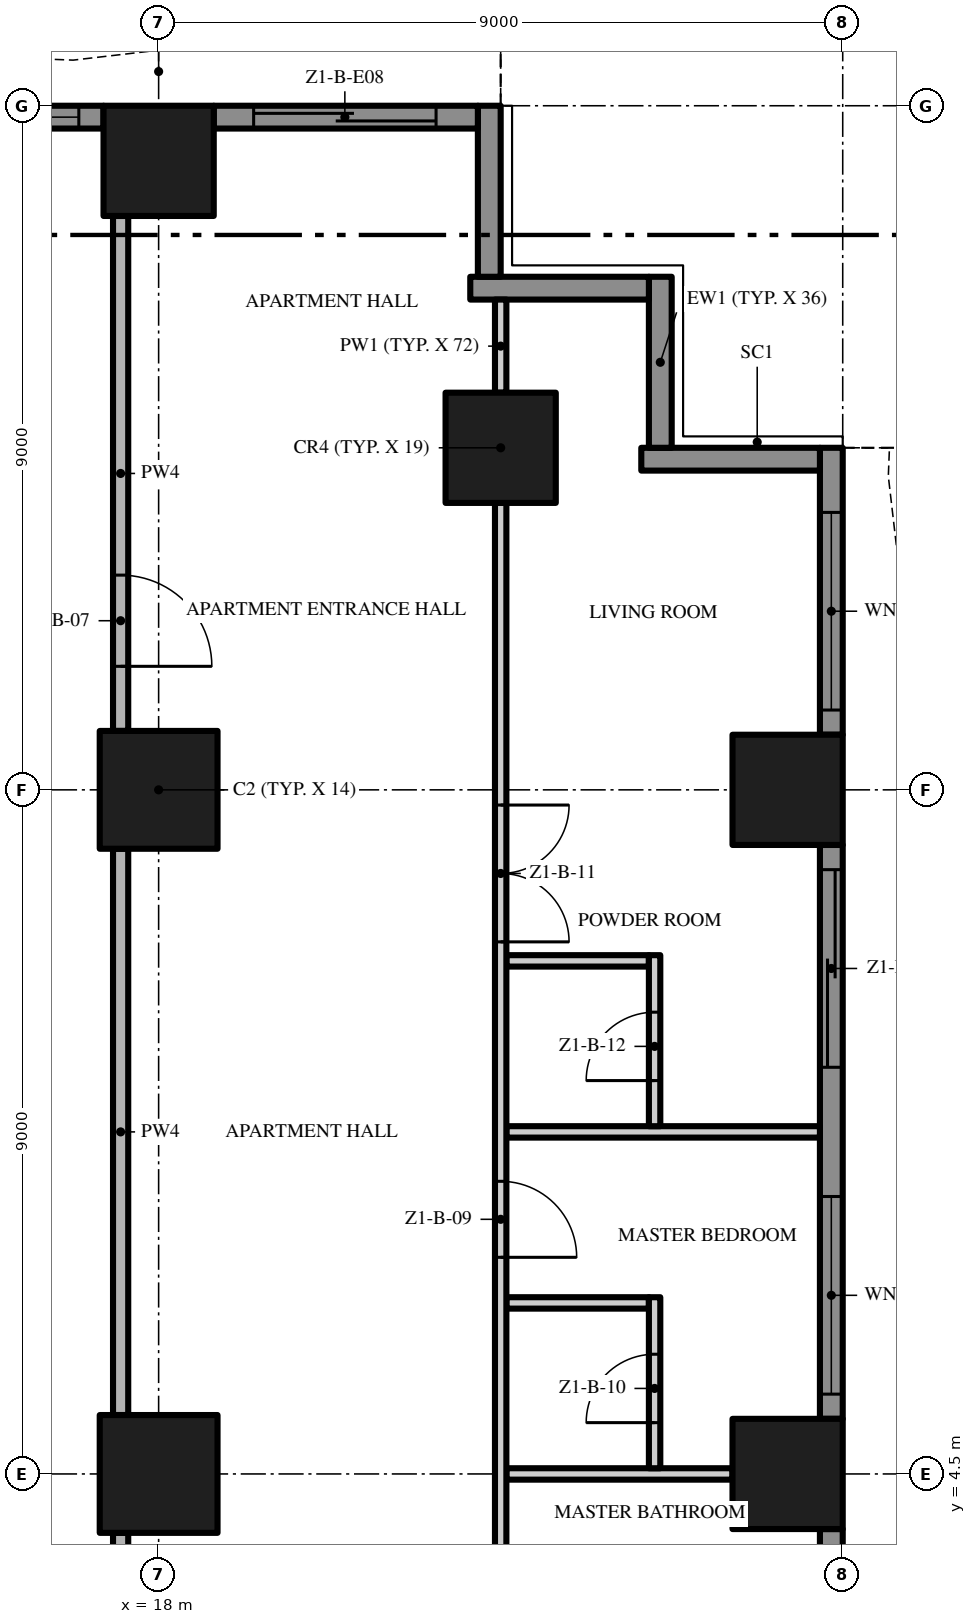
"""IFC4 building model, lengths in metres.
Left out: names, types, materials, properties, quantities, classifications, styles, units other than length and angle.
Written with IfcOpenShell. Run it as: python <this file> out.ifc"""

import sys

from ifc_helpers import new_model, si_unit, direction, frame, frame_2d, origin, origin_2d, place, context, subcontext, project, spatial, polyline, rectangle, outline, extrude, element, fill, save


model = new_model("IFC4")
c1 = context("Model", 3, precision=1e-05, world=origin(), true_north=direction((0.0, 1.0)))
c2 = subcontext(c1, "Body", "Model", "MODEL_VIEW")
j1 = project(units=[si_unit("LENGTHUNIT", "METRE"), si_unit("PLANEANGLEUNIT", "RADIAN")], contexts=[c1])
p1 = place(None, origin())
s1 = spatial("IfcSite", under=j1, at=p1, CompositionType="ELEMENT")
p2 = place(p1, origin())
s2 = spatial("IfcBuilding", under=s1, at=p2, CompositionType="ELEMENT")
p3 = place(p2, frame((0.0, 0.0, 26.4)))
s3 = spatial("IfcBuildingStorey", under=s2, at=p3, CompositionType="ELEMENT", Elevation=26.4)
p4 = place(p3, frame((18.0, 13.5, 0.0), z_axis=(0.0, 0.0, 1.0), x_axis=(1.0, 0.0, 0.0)))
e1 = element("IfcColumn", 1, at=p4, inside=s3, PredefinedType="COLUMN", context=c2, shape_type="SweptSolid", body=[
    extrude(rectangle(XDim=1.55, YDim=1.55, at=origin_2d()), origin(), (0.0, 0.0, 1.0), 3.5),
])
p5 = place(p3, frame((18.0, 21.775, 0.0), z_axis=(0.0, 0.0, 1.0), x_axis=(1.0, 0.0, 0.0)))
e2 = element("IfcColumn", 2, at=p5, inside=s3, PredefinedType="COLUMN", context=c2, shape_type="SweptSolid", body=[
    extrude(rectangle(XDim=1.45, YDim=1.45, at=origin_2d()), origin(), (0.0, 0.0, 1.0), 3.5),
])
p6 = place(p3, frame((18.0, 4.5, 0.0), z_axis=(0.0, 0.0, 1.0), x_axis=(1.0, 0.0, 0.0)))
e3 = element("IfcColumn", 3, at=p6, inside=s3, PredefinedType="COLUMN", context=c2, shape_type="SweptSolid", body=[
    extrude(rectangle(XDim=1.55, YDim=1.55, at=origin_2d()), origin(), (0.0, 0.0, 1.0), 3.5),
])
for number, where, z_axis, x_axis in (
    (4, (26.275, 13.5, 0.0), (0.0, 0.0, 1.0), (1.0, 0.0, 0.0)),
    (5, (22.5, 18.0, 0.0), (0.0, 0.0, 1.0), (1.0, 0.0, 0.0)),
    (6, (26.275, 4.5, 0.0), (0.0, 0.0, 1.0), (1.0, 0.0, 0.0)),
):
    element("IfcColumn", number, at=place(p3, frame(where, z_axis=z_axis, x_axis=x_axis)), inside=s3, PredefinedType="COLUMN", context=c2, shape_type="SweptSolid", body=[
        extrude(rectangle(XDim=1.45, YDim=1.45, at=origin_2d()), origin(), (0.0, 0.0, 1.0), 3.5),
    ])
p7 = place(p3, frame((26.85, 3.775, 0.0), z_axis=(0.0, 0.0, 1.0), x_axis=(0.0, -1.0, 0.0)))
e7 = element("IfcWall", 7, at=p7, inside=s3, PredefinedType="SOLIDWALL", context=c2, shape_type="SweptSolid", body=[
    extrude(rectangle(XDim=7.55, YDim=0.3, at=frame_2d((3.775, 0.0))), origin(), (0.0, 0.0, 1.0), 3.5),
])
p8 = place(p7, frame((4.625, 0.0, 0.0)))
e8 = element("IfcOpeningElement", 8, at=p8, cuts=e7, PredefinedType="OPENING", context=c2, shape_type="SweptSolid", body=[
    extrude(rectangle(XDim=2.6, YDim=2.4, at=frame_2d((1.3, 1.2))), frame((0.0, 0.16, 0.0), z_axis=(0.0, -1.0, 0.0), x_axis=(1.0, 0.0, 0.0)), (0.0, 0.0, 1.0), 0.32),
])
p9 = place(p7, frame((0.325, 0.0, 0.45)))
e9 = element("IfcOpeningElement", 9, at=p9, cuts=e7, PredefinedType="OPENING", context=c2, shape_type="SweptSolid", body=[
    extrude(rectangle(XDim=2.6, YDim=2.65, at=frame_2d((1.3, 1.325))), frame((0.0, 0.16, 0.0), z_axis=(0.0, -1.0, 0.0), x_axis=(1.0, 0.0, 0.0)), (0.0, 0.0, 1.0), 0.32),
])
p10 = place(p3, frame((26.85, 12.775, 0.0), z_axis=(0.0, 0.0, 1.0), x_axis=(0.0, -1.0, 0.0)))
e10 = element("IfcWall", 10, at=p10, inside=s3, PredefinedType="SOLIDWALL", context=c2, shape_type="SweptSolid", body=[
    extrude(rectangle(XDim=7.55, YDim=0.3, at=frame_2d((3.775, 0.0))), origin(), (0.0, 0.0, 1.0), 3.5),
])
p11 = place(p10, frame((4.625, 0.0, 0.45)))
e11 = element("IfcOpeningElement", 11, at=p11, cuts=e10, PredefinedType="OPENING", context=c2, shape_type="SweptSolid", body=[
    extrude(rectangle(XDim=2.6, YDim=2.65, at=frame_2d((1.3, 1.325))), frame((0.0, 0.16, 0.0), z_axis=(0.0, -1.0, 0.0), x_axis=(1.0, 0.0, 0.0)), (0.0, 0.0, 1.0), 0.32),
])
p12 = place(p10, frame((0.325, 0.0, 0.0)))
e12 = element("IfcOpeningElement", 12, at=p12, cuts=e10, PredefinedType="OPENING", context=c2, shape_type="SweptSolid", body=[
    extrude(rectangle(XDim=2.6, YDim=2.4, at=frame_2d((1.3, 1.2))), frame((0.0, 0.16, 0.0), z_axis=(0.0, -1.0, 0.0), x_axis=(1.0, 0.0, 0.0)), (0.0, 0.0, 1.0), 0.32),
])
p13 = place(p3, frame((26.85, 18.0, 0.0), z_axis=(0.0, 0.0, 1.0), x_axis=(0.0, -1.0, 0.0)))
e13 = element("IfcWall", 13, at=p13, inside=s3, PredefinedType="SOLIDWALL", context=c2, shape_type="SweptSolid", body=[
    extrude(rectangle(XDim=3.775, YDim=0.3, at=frame_2d((1.887, 0.0))), origin(), (0.0, 0.0, 1.0), 3.5),
])
p14 = place(p13, frame((0.85, 0.0, 0.45)))
e14 = element("IfcOpeningElement", 14, at=p14, cuts=e13, PredefinedType="OPENING", context=c2, shape_type="SweptSolid", body=[
    extrude(rectangle(XDim=2.6, YDim=2.65, at=frame_2d((1.3, 1.325))), frame((0.0, 0.16, 0.0), z_axis=(0.0, -1.0, 0.0), x_axis=(1.0, 0.0, 0.0)), (0.0, 0.0, 1.0), 0.32),
])
p15 = place(p3, frame((24.35, 17.85, 0.0), z_axis=(0.0, 0.0, 1.0), x_axis=(1.0, 0.0, 0.0)))
e15 = element("IfcWall", 15, at=p15, inside=s3, PredefinedType="SOLIDWALL", context=c2, shape_type="SweptSolid", body=[
    extrude(rectangle(XDim=2.35, YDim=0.3, at=frame_2d((1.175, 0.0))), origin(), (0.0, 0.0, 1.0), 3.5),
])
p16 = place(p3, frame((24.6, 20.25, 0.0), z_axis=(0.0, 0.0, 1.0), x_axis=(0.0, -1.0, 0.0)))
e16 = element("IfcWall", 16, at=p16, inside=s3, PredefinedType="SOLIDWALL", context=c2, shape_type="SweptSolid", body=[
    extrude(rectangle(XDim=2.25, YDim=0.3, at=frame_2d((1.125, 0.0))), origin(), (0.0, 0.0, 1.0), 3.5),
])
p17 = place(p3, frame((22.1, 20.1, 0.0), z_axis=(0.0, 0.0, 1.0), x_axis=(1.0, 0.0, 0.0)))
e17 = element("IfcWall", 17, at=p17, inside=s3, PredefinedType="SOLIDWALL", context=c2, shape_type="SweptSolid", body=[
    extrude(rectangle(XDim=2.35, YDim=0.3, at=frame_2d((1.175, 0.0))), origin(), (0.0, 0.0, 1.0), 3.5),
])
p18 = place(p3, frame((22.35, 22.5, 0.0), z_axis=(0.0, 0.0, 1.0), x_axis=(0.0, -1.0, 0.0)))
e18 = element("IfcWall", 18, at=p18, inside=s3, PredefinedType="SOLIDWALL", context=c2, shape_type="SweptSolid", body=[
    extrude(rectangle(XDim=2.25, YDim=0.3, at=frame_2d((1.125, 0.0))), origin(), (0.0, 0.0, 1.0), 3.5),
])
p19 = place(p3, frame((18.725, 22.35, 0.0), z_axis=(0.0, 0.0, 1.0), x_axis=(1.0, 0.0, 0.0)))
e19 = element("IfcWall", 19, at=p19, inside=s3, PredefinedType="SOLIDWALL", context=c2, shape_type="SweptSolid", body=[
    extrude(rectangle(XDim=3.475, YDim=0.3, at=frame_2d((1.738, 0.0))), origin(), (0.0, 0.0, 1.0), 3.5),
])
p20 = place(p19, frame((0.525, 0.0, 0.0)))
e20 = element("IfcOpeningElement", 20, at=p20, cuts=e19, PredefinedType="OPENING", context=c2, shape_type="SweptSolid", body=[
    extrude(rectangle(XDim=2.4, YDim=2.4, at=frame_2d((1.2, 1.2))), frame((0.0, 0.16, 0.0), z_axis=(0.0, -1.0, 0.0), x_axis=(1.0, 0.0, 0.0)), (0.0, 0.0, 1.0), 0.32),
])
p21 = place(p3, frame((13.5, 22.35, 0.0), z_axis=(0.0, 0.0, 1.0), x_axis=(1.0, 0.0, 0.0)))
e21 = element("IfcWall", 21, at=p21, inside=s3, PredefinedType="SOLIDWALL", context=c2, shape_type="SweptSolid", body=[
    extrude(rectangle(XDim=3.775, YDim=0.3, at=frame_2d((1.887, 0.0))), origin(), (0.0, 0.0, 1.0), 3.5),
])
p22 = place(p21, frame((0.85, 0.0, 0.45)))
e22 = element("IfcOpeningElement", 22, at=p22, cuts=e21, PredefinedType="OPENING", context=c2, shape_type="SweptSolid", body=[
    extrude(rectangle(XDim=2.6, YDim=2.65, at=frame_2d((1.3, 1.325))), frame((0.0, 0.16, 0.0), z_axis=(0.0, -1.0, 0.0), x_axis=(1.0, 0.0, 0.0)), (0.0, 0.0, 1.0), 0.32),
])
p23 = place(p3, origin())
e23 = element("IfcWall", 23, at=p23, inside=s3, PredefinedType="USERDEFINED", context=c2, shape_type="SweptSolid", body=[
    extrude(outline(polyline([(29.649, -18.0), (28.988, -16.5), (28.255, -15.0), (27.731, -13.5), (27.6, -12.375), (27.615, -12.0), (27.951, -10.5), (28.612, -9.0), (29.345, -7.5), (29.869, -6.0), (30.0, -4.875), (29.985, -4.5), (29.649, -3.0), (28.988, -1.5), (28.255, 0.0), (27.731, 1.5), (27.6, 2.625), (27.615, 3.0), (27.951, 4.5), (28.612, 6.0), (29.345, 7.5), (29.869, 9.0), (30.0, 10.125), (29.985, 10.5), (29.649, 12.0), (28.988, 13.5), (28.255, 15.0), (27.731, 16.5), (27.6, 17.625), (27.615, 18.0), (27.365, 18.01), (27.349, 17.615), (27.486, 16.444), (28.024, 14.904), (28.761, 13.395), (29.41, 11.921), (29.736, 10.467), (29.749, 10.135), (29.624, 9.056), (29.114, 7.596), (28.385, 6.105), (27.713, 4.579), (27.366, 3.033), (27.349, 2.615), (27.486, 1.444), (28.024, -0.096), (28.761, -1.605), (29.41, -3.079), (29.736, -4.533), (29.749, -4.865), (29.624, -5.944), (29.114, -7.404), (28.385, -8.895), (27.713, -10.421), (27.366, -11.967), (27.349, -12.385), (27.486, -13.556), (28.024, -15.096), (28.761, -16.605), (29.42, -18.101), (29.649, -18.0)])), origin(), (0.0, 0.0, 1.0), 0.9),
])
p24 = place(p3, origin())
e24 = element("IfcWall", 24, at=p24, inside=s3, PredefinedType="USERDEFINED", context=c2, shape_type="SweptSolid", body=[
    extrude(outline(polyline([(22.5, 25.149), (21.0, 24.488), (19.5, 23.755), (18.0, 23.231), (16.875, 23.1), (16.5, 23.115), (15.0, 23.451), (13.5, 24.112), (13.399, 23.883), (14.921, 23.213), (16.467, 22.866), (16.885, 22.849), (18.056, 22.986), (19.596, 23.524), (21.105, 24.261), (22.601, 24.92), (22.5, 25.149)])), origin(), (0.0, 0.0, 1.0), 0.9),
])
p25 = place(p3, frame((22.575, 4.5, 0.0), z_axis=(0.0, 0.0, 1.0), x_axis=(1.0, 0.0, 0.0)))
e25 = element("IfcWall", 25, at=p25, inside=s3, PredefinedType="PARTITIONING", context=c2, shape_type="SweptSolid", body=[
    extrude(rectangle(XDim=2.975, YDim=0.15, at=frame_2d((1.488, 0.0))), origin(), (0.0, 0.0, 1.0), 3.5),
])
p26 = place(p3, frame((22.575, 6.75, 0.0), z_axis=(0.0, 0.0, 1.0), x_axis=(1.0, 0.0, 0.0)))
e26 = element("IfcWall", 26, at=p26, inside=s3, PredefinedType="PARTITIONING", context=c2, shape_type="SweptSolid", body=[
    extrude(rectangle(XDim=1.875, YDim=0.15, at=frame_2d((0.938, 0.0))), origin(), (0.0, 0.0, 1.0), 3.5),
])
p27 = place(p3, frame((22.575, 9.0, 0.0), z_axis=(0.0, 0.0, 1.0), x_axis=(1.0, 0.0, 0.0)))
e27 = element("IfcWall", 27, at=p27, inside=s3, PredefinedType="PARTITIONING", context=c2, shape_type="SweptSolid", body=[
    extrude(rectangle(XDim=4.125, YDim=0.15, at=frame_2d((2.062, 0.0))), origin(), (0.0, 0.0, 1.0), 3.5),
])
p28 = place(p3, frame((22.575, 11.25, 0.0), z_axis=(0.0, 0.0, 1.0), x_axis=(1.0, 0.0, 0.0)))
e28 = element("IfcWall", 28, at=p28, inside=s3, PredefinedType="PARTITIONING", context=c2, shape_type="SweptSolid", body=[
    extrude(rectangle(XDim=1.875, YDim=0.15, at=frame_2d((0.938, 0.0))), origin(), (0.0, 0.0, 1.0), 3.5),
])
p29 = place(p3, frame((17.5, -0.2, 0.0), z_axis=(0.0, 0.0, 1.0), x_axis=(0.0, 1.0, 0.0)))
e29 = element("IfcWall", 29, at=p29, inside=s3, PredefinedType="PARTITIONING", context=c2, shape_type="SweptSolid", body=[
    extrude(rectangle(XDim=3.925, YDim=0.2, at=frame_2d((1.962, 0.0))), origin(), (0.0, 0.0, 1.0), 3.5),
])
p30 = place(p3, frame((17.5, 5.275, 0.0), z_axis=(0.0, 0.0, 1.0), x_axis=(0.0, 1.0, 0.0)))
e30 = element("IfcWall", 30, at=p30, inside=s3, PredefinedType="PARTITIONING", context=c2, shape_type="SweptSolid", body=[
    extrude(rectangle(XDim=7.45, YDim=0.2, at=frame_2d((3.725, 0.0))), origin(), (0.0, 0.0, 1.0), 3.5),
])
p31 = place(p3, frame((17.5, 21.05, 0.0), z_axis=(0.0, 0.0, 1.0), x_axis=(0.0, -1.0, 0.0)))
e31 = element("IfcWall", 31, at=p31, inside=s3, PredefinedType="PARTITIONING", context=c2, shape_type="SweptSolid", body=[
    extrude(rectangle(XDim=6.775, YDim=0.2, at=frame_2d((3.388, 0.0))), origin(), (0.0, 0.0, 1.0), 3.5),
])
p32 = place(p31, frame((4.725, 0.0, 0.0)))
e32 = element("IfcOpeningElement", 32, at=p32, cuts=e31, PredefinedType="OPENING", context=c2, shape_type="SweptSolid", body=[
    extrude(rectangle(XDim=1.2, YDim=2.4, at=frame_2d((0.6, 1.2))), frame((0.0, 0.11, 0.0), z_axis=(0.0, -1.0, 0.0), x_axis=(1.0, 0.0, 0.0)), (0.0, 0.0, 1.0), 0.22),
])
p33 = place(p3, frame((22.5, 17.275, 0.0), z_axis=(0.0, 0.0, 1.0), x_axis=(0.0, -1.0, 0.0)))
e33 = element("IfcWall", 33, at=p33, inside=s3, PredefinedType="PARTITIONING", context=c2, shape_type="SweptSolid", body=[
    extrude(rectangle(XDim=17.175, YDim=0.15, at=frame_2d((8.588, 0.0))), origin(), (0.0, 0.0, 1.0), 3.5),
])
p34 = place(p33, frame((14.525, 0.0, 0.0)))
e34 = element("IfcOpeningElement", 34, at=p34, cuts=e33, PredefinedType="OPENING", context=c2, shape_type="SweptSolid", body=[
    extrude(rectangle(XDim=1.0, YDim=2.4, at=frame_2d((0.5, 1.2))), frame((0.0, 0.085, 0.0), z_axis=(0.0, -1.0, 0.0), x_axis=(1.0, 0.0, 0.0)), (0.0, 0.0, 1.0), 0.17),
])
p35 = place(p33, frame((8.925, 0.0, 0.0)))
e35 = element("IfcOpeningElement", 35, at=p35, cuts=e33, PredefinedType="OPENING", context=c2, shape_type="SweptSolid", body=[
    extrude(rectangle(XDim=1.0, YDim=2.4, at=frame_2d((0.5, 1.2))), frame((0.0, 0.085, 0.0), z_axis=(0.0, -1.0, 0.0), x_axis=(1.0, 0.0, 0.0)), (0.0, 0.0, 1.0), 0.17),
])
p36 = place(p33, frame((3.975, 0.0, 0.0)))
e36 = element("IfcOpeningElement", 36, at=p36, cuts=e33, PredefinedType="OPENING", context=c2, shape_type="SweptSolid", body=[
    extrude(rectangle(XDim=1.8, YDim=2.4, at=frame_2d((0.9, 1.2))), frame((0.0, 0.085, 0.0), z_axis=(0.0, -1.0, 0.0), x_axis=(1.0, 0.0, 0.0)), (0.0, 0.0, 1.0), 0.17),
])
p37 = place(p3, frame((22.5, 18.725, 0.0), z_axis=(0.0, 0.0, 1.0), x_axis=(0.0, 1.0, 0.0)))
e37 = element("IfcWall", 37, at=p37, inside=s3, PredefinedType="PARTITIONING", context=c2, shape_type="SweptSolid", body=[
    extrude(rectangle(XDim=1.225, YDim=0.15, at=frame_2d((0.613, 0.0))), origin(), (0.0, 0.0, 1.0), 3.5),
])
p38 = place(p3, frame((24.525, 4.575, 0.0), z_axis=(0.0, 0.0, 1.0), x_axis=(0.0, 1.0, 0.0)))
e38 = element("IfcWall", 38, at=p38, inside=s3, PredefinedType="PARTITIONING", context=c2, shape_type="SweptSolid", body=[
    extrude(rectangle(XDim=2.25, YDim=0.15, at=frame_2d((1.125, 0.0))), origin(), (0.0, 0.0, 1.0), 3.5),
])
p39 = place(p38, frame((0.6, 0.0, 0.0)))
e39 = element("IfcOpeningElement", 39, at=p39, cuts=e38, PredefinedType="OPENING", context=c2, shape_type="SweptSolid", body=[
    extrude(rectangle(XDim=0.9, YDim=2.1, at=frame_2d((0.45, 1.05))), frame((0.0, 0.085, 0.0), z_axis=(0.0, -1.0, 0.0), x_axis=(1.0, 0.0, 0.0)), (0.0, 0.0, 1.0), 0.17),
])
p40 = place(p3, frame((24.525, 9.075, 0.0), z_axis=(0.0, 0.0, 1.0), x_axis=(0.0, 1.0, 0.0)))
e40 = element("IfcWall", 40, at=p40, inside=s3, PredefinedType="PARTITIONING", context=c2, shape_type="SweptSolid", body=[
    extrude(rectangle(XDim=2.25, YDim=0.15, at=frame_2d((1.125, 0.0))), origin(), (0.0, 0.0, 1.0), 3.5),
])
p41 = place(p40, frame((0.6, 0.0, 0.0)))
e41 = element("IfcOpeningElement", 41, at=p41, cuts=e40, PredefinedType="OPENING", context=c2, shape_type="SweptSolid", body=[
    extrude(rectangle(XDim=0.9, YDim=2.1, at=frame_2d((0.45, 1.05))), frame((0.0, 0.085, 0.0), z_axis=(0.0, -1.0, 0.0), x_axis=(1.0, 0.0, 0.0)), (0.0, 0.0, 1.0), 0.17),
])
p42 = place(p11, origin())
e42 = element("IfcWindow", 42, at=p42, inside=s3, PartitioningType="SINGLE_PANEL", PredefinedType="WINDOW", context=c2, shape_type="SweptSolid", body=[
    extrude(rectangle(XDim=2.6, YDim=2.65, at=frame_2d((1.3, 1.325))), frame((0.0, 0.03, 0.0), z_axis=(0.0, -1.0, 0.0), x_axis=(1.0, 0.0, 0.0)), (0.0, 0.0, 1.0), 0.06),
])
fill(e11, e42)
p43 = place(p12, origin())
e43 = element("IfcDoor", 43, at=p43, inside=s3, OperationType="SINGLE_SWING_LEFT", PredefinedType="DOOR", context=c2, shape_type="SweptSolid", body=[
    extrude(rectangle(XDim=2.6, YDim=2.4, at=frame_2d((1.3, 1.2))), frame((0.0, 0.025, 0.0), z_axis=(0.0, -1.0, 0.0), x_axis=(1.0, 0.0, 0.0)), (0.0, 0.0, 1.0), 0.05),
])
fill(e12, e43)
p44 = place(p14, origin())
e44 = element("IfcWindow", 44, at=p44, inside=s3, PartitioningType="SINGLE_PANEL", PredefinedType="WINDOW", context=c2, shape_type="SweptSolid", body=[
    extrude(rectangle(XDim=2.6, YDim=2.65, at=frame_2d((1.3, 1.325))), frame((0.0, 0.03, 0.0), z_axis=(0.0, -1.0, 0.0), x_axis=(1.0, 0.0, 0.0)), (0.0, 0.0, 1.0), 0.06),
])
fill(e14, e44)
p45 = place(p20, origin())
e45 = element("IfcDoor", 45, at=p45, inside=s3, OperationType="SINGLE_SWING_LEFT", PredefinedType="DOOR", context=c2, shape_type="SweptSolid", body=[
    extrude(rectangle(XDim=2.4, YDim=2.4, at=frame_2d((1.2, 1.2))), frame((0.0, 0.025, 0.0), z_axis=(0.0, -1.0, 0.0), x_axis=(1.0, 0.0, 0.0)), (0.0, 0.0, 1.0), 0.05),
])
fill(e20, e45)
p46 = place(p22, origin())
e46 = element("IfcWindow", 46, at=p46, inside=s3, PartitioningType="SINGLE_PANEL", PredefinedType="WINDOW", context=c2, shape_type="SweptSolid", body=[
    extrude(rectangle(XDim=2.6, YDim=2.65, at=frame_2d((1.3, 1.325))), frame((0.0, 0.03, 0.0), z_axis=(0.0, -1.0, 0.0), x_axis=(1.0, 0.0, 0.0)), (0.0, 0.0, 1.0), 0.06),
])
fill(e22, e46)
p47 = place(p32, origin())
e47 = element("IfcDoor", 47, at=p47, inside=s3, OperationType="SINGLE_SWING_RIGHT", PredefinedType="DOOR", context=c2, shape_type="SweptSolid", body=[
    extrude(rectangle(XDim=1.2, YDim=2.4, at=frame_2d((0.6, 1.2))), frame((0.0, 0.025, 0.0), z_axis=(0.0, -1.0, 0.0), x_axis=(1.0, 0.0, 0.0)), (0.0, 0.0, 1.0), 0.05),
])
fill(e32, e47)
p48 = place(p35, origin())
e48 = element("IfcDoor", 48, at=p48, inside=s3, OperationType="SINGLE_SWING_RIGHT", PredefinedType="DOOR", context=c2, shape_type="SweptSolid", body=[
    extrude(rectangle(XDim=1.0, YDim=2.4, at=frame_2d((0.5, 1.2))), frame((0.0, 0.025, 0.0), z_axis=(0.0, -1.0, 0.0), x_axis=(1.0, 0.0, 0.0)), (0.0, 0.0, 1.0), 0.05),
])
fill(e35, e48)
p49 = place(p39, origin())
e49 = element("IfcDoor", 49, at=p49, inside=s3, OperationType="SINGLE_SWING_LEFT", PredefinedType="DOOR", context=c2, shape_type="SweptSolid", body=[
    extrude(rectangle(XDim=0.9, YDim=2.1, at=frame_2d((0.45, 1.05))), frame((0.0, 0.025, 0.0), z_axis=(0.0, -1.0, 0.0), x_axis=(1.0, 0.0, 0.0)), (0.0, 0.0, 1.0), 0.05),
])
fill(e39, e49)
p50 = place(p36, origin())
e50 = element("IfcDoor", 50, at=p50, inside=s3, OperationType="DOUBLE_DOOR_SINGLE_SWING", PredefinedType="DOOR", context=c2, shape_type="SweptSolid", body=[
    extrude(rectangle(XDim=1.8, YDim=2.4, at=frame_2d((0.9, 1.2))), frame((0.0, 0.025, 0.0), z_axis=(0.0, -1.0, 0.0), x_axis=(1.0, 0.0, 0.0)), (0.0, 0.0, 1.0), 0.05),
])
fill(e36, e50)
p51 = place(p41, origin())
e51 = element("IfcDoor", 51, at=p51, inside=s3, OperationType="SINGLE_SWING_LEFT", PredefinedType="DOOR", context=c2, shape_type="SweptSolid", body=[
    extrude(rectangle(XDim=0.9, YDim=2.1, at=frame_2d((0.45, 1.05))), frame((0.0, 0.025, 0.0), z_axis=(0.0, -1.0, 0.0), x_axis=(1.0, 0.0, 0.0)), (0.0, 0.0, 1.0), 0.05),
])
fill(e41, e51)
save(model, sys.argv[1])
